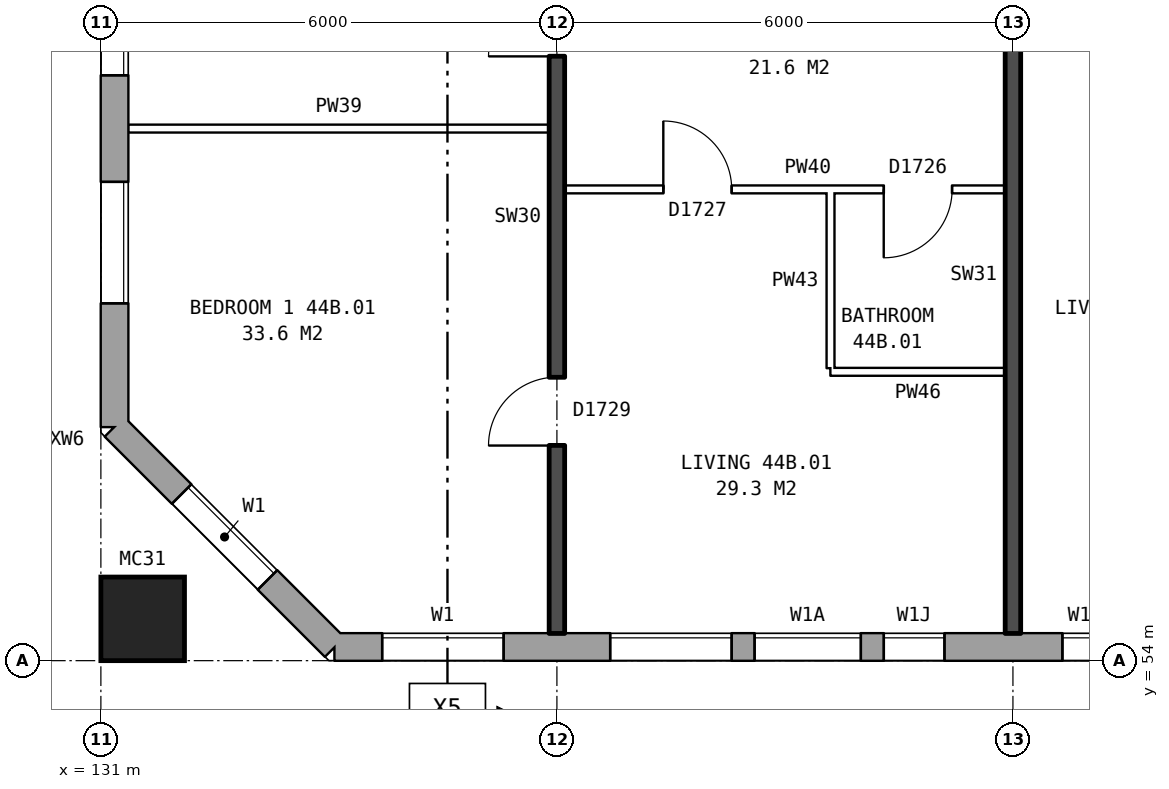
"""IFC4 building model, lengths in metres.
Left out: names, types, materials, properties, quantities, classifications, styles, units other than length and angle.
Written with IfcOpenShell. Run it as: python <this file> out.ifc"""

import sys

from ifc_helpers import new_model, si_unit, direction, frame, frame_2d, origin, origin_2d, place, context, subcontext, project, spatial, rectangle, hollow_rectangle, extrude, element, fill, save


model = new_model("IFC4")
c1 = context("Model", 3, precision=1e-05, world=origin(), true_north=direction((0.0, 1.0)))
c2 = subcontext(c1, "Body", "Model", "MODEL_VIEW")
j1 = project(units=[si_unit("LENGTHUNIT", "METRE"), si_unit("PLANEANGLEUNIT", "RADIAN")], contexts=[c1])
p1 = place(None, origin())
s1 = spatial("IfcSite", under=j1, at=p1, CompositionType="ELEMENT")
p2 = place(p1, origin())
s2 = spatial("IfcBuilding", under=s1, at=p2, CompositionType="ELEMENT")
p3 = place(p2, frame((0.0, 0.0, 157.8)))
s3 = spatial("IfcBuildingStorey", under=s2, at=p3, CompositionType="ELEMENT", Elevation=157.8)
p4 = place(p3, frame((131.55, 54.55, 0.0), z_axis=(0.0, 0.0, 1.0), x_axis=(1.0, 0.0, 0.0)))
e1 = element("IfcColumn", 1, at=p4, inside=s3, PredefinedType="COLUMN", context=c2, shape_type="SweptSolid", body=[
    extrude(hollow_rectangle(XDim=1.1, YDim=1.1, WallThickness=0.06, at=origin_2d()), origin(), (0.0, 0.0, 1.0), 3.1),
])
p5 = place(p3, frame((131.18, 57.075, 0.0), z_axis=(0.0, 0.0, 1.0), x_axis=(0.707106781187, -0.707106781187, 0.0)))
e2 = element("IfcWall", 2, at=p5, inside=s3, PredefinedType="STANDARD", context=c2, shape_type="SweptSolid", body=[
    extrude(rectangle(XDim=4.094, YDim=0.36, at=frame_2d((2.047, 0.0))), origin(), (0.0, 0.0, 1.0), 2.85),
])
p6 = place(p5, frame((1.247, 0.0, 0.8)))
e3 = element("IfcOpeningElement", 3, at=p6, cuts=e2, PredefinedType="OPENING", context=c2, shape_type="SweptSolid", body=[
    extrude(rectangle(XDim=1.6, YDim=1.8, at=frame_2d((0.8, 0.9))), frame((0.0, 0.19, 0.0), z_axis=(0.0, -1.0, 0.0), x_axis=(1.0, 0.0, 0.0)), (0.0, 0.0, 1.0), 0.38),
])
p7 = place(p3, frame((134.075, 54.18, 0.0), z_axis=(0.0, 0.0, 1.0), x_axis=(1.0, 0.0, 0.0)))
e4 = element("IfcWall", 4, at=p7, inside=s3, PredefinedType="STANDARD", context=c2, shape_type="SweptSolid", body=[
    extrude(rectangle(XDim=34.351, YDim=0.36, at=frame_2d((17.175, 0.0))), origin(), (0.0, 0.0, 1.0), 2.85),
])
p8 = place(p7, frame((0.625, 0.0, 0.8)))
e5 = element("IfcOpeningElement", 5, at=p8, cuts=e4, PredefinedType="OPENING", context=c2, shape_type="SweptSolid", body=[
    extrude(rectangle(XDim=1.6, YDim=1.8, at=frame_2d((0.8, 0.9))), frame((0.0, 0.19, 0.0), z_axis=(0.0, -1.0, 0.0), x_axis=(1.0, 0.0, 0.0)), (0.0, 0.0, 1.0), 0.38),
])
p9 = place(p7, frame((3.625, 0.0, 0.8)))
e6 = element("IfcOpeningElement", 6, at=p9, cuts=e4, PredefinedType="OPENING", context=c2, shape_type="SweptSolid", body=[
    extrude(rectangle(XDim=1.6, YDim=1.8, at=frame_2d((0.8, 0.9))), frame((0.0, 0.19, 0.0), z_axis=(0.0, -1.0, 0.0), x_axis=(1.0, 0.0, 0.0)), (0.0, 0.0, 1.0), 0.38),
])
p10 = place(p7, frame((5.525, 0.0, 0.8)))
e7 = element("IfcOpeningElement", 7, at=p10, cuts=e4, PredefinedType="OPENING", context=c2, shape_type="SweptSolid", body=[
    extrude(rectangle(XDim=1.4, YDim=1.8, at=frame_2d((0.7, 0.9))), frame((0.0, 0.19, 0.0), z_axis=(0.0, -1.0, 0.0), x_axis=(1.0, 0.0, 0.0)), (0.0, 0.0, 1.0), 0.38),
])
p11 = place(p7, frame((9.575, 0.0, 0.45)))
e8 = element("IfcOpeningElement", 8, at=p11, cuts=e4, PredefinedType="OPENING", context=c2, shape_type="SweptSolid", body=[
    extrude(rectangle(XDim=0.6, YDim=0.9, at=frame_2d((0.3, 0.45))), frame((0.0, 0.19, 0.0), z_axis=(0.0, -1.0, 0.0), x_axis=(1.0, 0.0, 0.0)), (0.0, 0.0, 1.0), 0.38),
])
p12 = place(p7, frame((12.625, 0.0, 0.8)))
e9 = element("IfcOpeningElement", 9, at=p12, cuts=e4, PredefinedType="OPENING", context=c2, shape_type="SweptSolid", body=[
    extrude(rectangle(XDim=1.6, YDim=1.8, at=frame_2d((0.8, 0.9))), frame((0.0, 0.19, 0.0), z_axis=(0.0, -1.0, 0.0), x_axis=(1.0, 0.0, 0.0)), (0.0, 0.0, 1.0), 0.38),
])
p13 = place(p7, frame((15.625, 0.0, 0.8)))
e10 = element("IfcOpeningElement", 10, at=p13, cuts=e4, PredefinedType="OPENING", context=c2, shape_type="SweptSolid", body=[
    extrude(rectangle(XDim=1.6, YDim=1.8, at=frame_2d((0.8, 0.9))), frame((0.0, 0.19, 0.0), z_axis=(0.0, -1.0, 0.0), x_axis=(1.0, 0.0, 0.0)), (0.0, 0.0, 1.0), 0.38),
])
p14 = place(p7, frame((18.625, 0.0, 0.8)))
e11 = element("IfcOpeningElement", 11, at=p14, cuts=e4, PredefinedType="OPENING", context=c2, shape_type="SweptSolid", body=[
    extrude(rectangle(XDim=1.6, YDim=1.8, at=frame_2d((0.8, 0.9))), frame((0.0, 0.19, 0.0), z_axis=(0.0, -1.0, 0.0), x_axis=(1.0, 0.0, 0.0)), (0.0, 0.0, 1.0), 0.38),
])
p15 = place(p7, frame((21.625, 0.0, 0.8)))
e12 = element("IfcOpeningElement", 12, at=p15, cuts=e4, PredefinedType="OPENING", context=c2, shape_type="SweptSolid", body=[
    extrude(rectangle(XDim=1.6, YDim=1.8, at=frame_2d((0.8, 0.9))), frame((0.0, 0.19, 0.0), z_axis=(0.0, -1.0, 0.0), x_axis=(1.0, 0.0, 0.0)), (0.0, 0.0, 1.0), 0.38),
])
p16 = place(p7, frame((23.525, 0.0, 0.8)))
e13 = element("IfcOpeningElement", 13, at=p16, cuts=e4, PredefinedType="OPENING", context=c2, shape_type="SweptSolid", body=[
    extrude(rectangle(XDim=0.8, YDim=0.9, at=frame_2d((0.4, 0.45))), frame((0.0, 0.19, 0.0), z_axis=(0.0, -1.0, 0.0), x_axis=(1.0, 0.0, 0.0)), (0.0, 0.0, 1.0), 0.38),
])
p17 = place(p7, frame((27.625, 0.0, 0.8)))
e14 = element("IfcOpeningElement", 14, at=p17, cuts=e4, PredefinedType="OPENING", context=c2, shape_type="SweptSolid", body=[
    extrude(rectangle(XDim=1.6, YDim=1.8, at=frame_2d((0.8, 0.9))), frame((0.0, 0.19, 0.0), z_axis=(0.0, -1.0, 0.0), x_axis=(1.0, 0.0, 0.0)), (0.0, 0.0, 1.0), 0.38),
])
p18 = place(p7, frame((30.625, 0.0, 0.8)))
e15 = element("IfcOpeningElement", 15, at=p18, cuts=e4, PredefinedType="OPENING", context=c2, shape_type="SweptSolid", body=[
    extrude(rectangle(XDim=1.6, YDim=1.8, at=frame_2d((0.8, 0.9))), frame((0.0, 0.19, 0.0), z_axis=(0.0, -1.0, 0.0), x_axis=(1.0, 0.0, 0.0)), (0.0, 0.0, 1.0), 0.38),
])
p19 = place(p7, frame((7.225, 0.0, 1.0)))
e16 = element("IfcOpeningElement", 16, at=p19, cuts=e4, PredefinedType="OPENING", context=c2, shape_type="SweptSolid", body=[
    extrude(rectangle(XDim=0.8, YDim=1.5, at=frame_2d((0.4, 0.75))), frame((0.0, 0.19, 0.0), z_axis=(0.0, -1.0, 0.0), x_axis=(1.0, 0.0, 0.0)), (0.0, 0.0, 1.0), 0.38),
])
p20 = place(p7, frame((10.575, 0.0, 0.45)))
e17 = element("IfcOpeningElement", 17, at=p20, cuts=e4, PredefinedType="OPENING", context=c2, shape_type="SweptSolid", body=[
    extrude(rectangle(XDim=1.2, YDim=1.8, at=frame_2d((0.6, 0.9))), frame((0.0, 0.19, 0.0), z_axis=(0.0, -1.0, 0.0), x_axis=(1.0, 0.0, 0.0)), (0.0, 0.0, 1.0), 0.38),
])
p21 = place(p7, frame((25.525, 0.0, 1.7)))
e18 = element("IfcOpeningElement", 18, at=p21, cuts=e4, PredefinedType="OPENING", context=c2, shape_type="SweptSolid", body=[
    extrude(rectangle(XDim=1.2, YDim=0.9, at=frame_2d((0.6, 0.45))), frame((0.0, 0.19, 0.0), z_axis=(0.0, -1.0, 0.0), x_axis=(1.0, 0.0, 0.0)), (0.0, 0.0, 1.0), 0.38),
])
p22 = place(p3, frame((131.18, 82.925, 0.0), z_axis=(0.0, 0.0, 1.0), x_axis=(0.0, -1.0, 0.0)))
e19 = element("IfcWall", 19, at=p22, inside=s3, PredefinedType="STANDARD", context=c2, shape_type="SweptSolid", body=[
    extrude(rectangle(XDim=25.851, YDim=0.36, at=frame_2d((12.925, 0.0))), origin(), (0.0, 0.0, 1.0), 2.85),
])
p23 = place(p22, frame((1.625, 0.0, 0.8)))
e20 = element("IfcOpeningElement", 20, at=p23, cuts=e19, PredefinedType="OPENING", context=c2, shape_type="SweptSolid", body=[
    extrude(rectangle(XDim=1.6, YDim=1.8, at=frame_2d((0.8, 0.9))), frame((0.0, 0.19, 0.0), z_axis=(0.0, -1.0, 0.0), x_axis=(1.0, 0.0, 0.0)), (0.0, 0.0, 1.0), 0.38),
])
p24 = place(p22, frame((4.625, 0.0, 0.8)))
e21 = element("IfcOpeningElement", 21, at=p24, cuts=e19, PredefinedType="OPENING", context=c2, shape_type="SweptSolid", body=[
    extrude(rectangle(XDim=1.6, YDim=1.8, at=frame_2d((0.8, 0.9))), frame((0.0, 0.19, 0.0), z_axis=(0.0, -1.0, 0.0), x_axis=(1.0, 0.0, 0.0)), (0.0, 0.0, 1.0), 0.38),
])
p25 = place(p22, frame((19.625, 0.0, 0.8)))
e22 = element("IfcOpeningElement", 22, at=p25, cuts=e19, PredefinedType="OPENING", context=c2, shape_type="SweptSolid", body=[
    extrude(rectangle(XDim=1.6, YDim=1.8, at=frame_2d((0.8, 0.9))), frame((0.0, 0.19, 0.0), z_axis=(0.0, -1.0, 0.0), x_axis=(1.0, 0.0, 0.0)), (0.0, 0.0, 1.0), 0.38),
])
p26 = place(p22, frame((22.625, 0.0, 0.8)))
e23 = element("IfcOpeningElement", 23, at=p26, cuts=e19, PredefinedType="OPENING", context=c2, shape_type="SweptSolid", body=[
    extrude(rectangle(XDim=1.6, YDim=1.8, at=frame_2d((0.8, 0.9))), frame((0.0, 0.19, 0.0), z_axis=(0.0, -1.0, 0.0), x_axis=(1.0, 0.0, 0.0)), (0.0, 0.0, 1.0), 0.38),
])
p27 = place(p3, frame((140.6, 57.8, 0.0), z_axis=(0.0, 0.0, 1.0), x_axis=(1.0, 0.0, 0.0)))
e24 = element("IfcWall", 24, at=p27, inside=s3, PredefinedType="PARTITIONING", context=c2, shape_type="SweptSolid", body=[
    extrude(rectangle(XDim=2.3, YDim=0.1, at=frame_2d((1.15, 0.0))), origin(), (0.0, 0.0, 1.0), 2.85),
])
p28 = place(p3, frame((137.1, 60.2, 0.0), z_axis=(0.0, 0.0, 1.0), x_axis=(1.0, 0.0, 0.0)))
e25 = element("IfcWall", 25, at=p28, inside=s3, PredefinedType="PARTITIONING", context=c2, shape_type="SweptSolid", body=[
    extrude(rectangle(XDim=5.8, YDim=0.1, at=frame_2d((2.9, 0.0))), origin(), (0.0, 0.0, 1.0), 2.85),
])
p29 = place(p28, frame((1.3, 0.0, 0.0)))
e26 = element("IfcOpeningElement", 26, at=p29, cuts=e25, PredefinedType="OPENING", context=c2, shape_type="SweptSolid", body=[
    extrude(rectangle(XDim=0.9, YDim=2.1, at=frame_2d((0.45, 1.05))), frame((0.0, 0.06, 0.0), z_axis=(0.0, -1.0, 0.0), x_axis=(1.0, 0.0, 0.0)), (0.0, 0.0, 1.0), 0.12),
])
p30 = place(p28, frame((4.2, 0.0, 0.0)))
e27 = element("IfcOpeningElement", 27, at=p30, cuts=e25, PredefinedType="OPENING", context=c2, shape_type="SweptSolid", body=[
    extrude(rectangle(XDim=0.9, YDim=2.1, at=frame_2d((0.45, 1.05))), frame((0.0, 0.06, 0.0), z_axis=(0.0, -1.0, 0.0), x_axis=(1.0, 0.0, 0.0)), (0.0, 0.0, 1.0), 0.12),
])
p31 = place(p3, frame((131.36, 61.0, 0.0), z_axis=(0.0, 0.0, 1.0), x_axis=(1.0, 0.0, 0.0)))
e28 = element("IfcWall", 28, at=p31, inside=s3, PredefinedType="PARTITIONING", context=c2, shape_type="SweptSolid", body=[
    extrude(rectangle(XDim=5.54, YDim=0.1, at=frame_2d((2.77, 0.0))), origin(), (0.0, 0.0, 1.0), 2.85),
])
p32 = place(p3, frame((137.0, 54.36, 0.0), z_axis=(0.0, 0.0, 1.0), x_axis=(0.0, 1.0, 0.0)))
e29 = element("IfcWall", 29, at=p32, inside=s3, PredefinedType="SOLIDWALL", context=c2, shape_type="SweptSolid", body=[
    extrude(rectangle(XDim=9.44, YDim=0.2, at=frame_2d((4.72, 0.0))), origin(), (0.0, 0.0, 1.0), 2.85),
])
p33 = place(p32, frame((2.47, 0.0, 0.0)))
e30 = element("IfcOpeningElement", 30, at=p33, cuts=e29, PredefinedType="OPENING", context=c2, shape_type="SweptSolid", body=[
    extrude(rectangle(XDim=0.9, YDim=2.1, at=frame_2d((0.45, 1.05))), frame((0.0, 0.11, 0.0), z_axis=(0.0, -1.0, 0.0), x_axis=(1.0, 0.0, 0.0)), (0.0, 0.0, 1.0), 0.22),
])
p34 = place(p32, frame((7.59, 0.0, 0.0)))
e31 = element("IfcOpeningElement", 31, at=p34, cuts=e29, PredefinedType="OPENING", context=c2, shape_type="SweptSolid", body=[
    extrude(rectangle(XDim=0.9, YDim=2.1, at=frame_2d((0.45, 1.05))), frame((0.0, 0.11, 0.0), z_axis=(0.0, -1.0, 0.0), x_axis=(1.0, 0.0, 0.0)), (0.0, 0.0, 1.0), 0.22),
])
p35 = place(p3, frame((140.6, 57.85, 0.0), z_axis=(0.0, 0.0, 1.0), x_axis=(0.0, 1.0, 0.0)))
e32 = element("IfcWall", 32, at=p35, inside=s3, PredefinedType="PARTITIONING", context=c2, shape_type="SweptSolid", body=[
    extrude(rectangle(XDim=2.3, YDim=0.1, at=frame_2d((1.15, 0.0))), origin(), (0.0, 0.0, 1.0), 2.85),
])
p36 = place(p3, frame((143.0, 54.36, 0.0), z_axis=(0.0, 0.0, 1.0), x_axis=(0.0, 1.0, 0.0)))
e33 = element("IfcWall", 33, at=p36, inside=s3, PredefinedType="SOLIDWALL", context=c2, shape_type="SweptSolid", body=[
    extrude(rectangle(XDim=9.44, YDim=0.2, at=frame_2d((4.72, 0.0))), origin(), (0.0, 0.0, 1.0), 2.85),
])
p37 = place(p6, origin())
e34 = element("IfcWindow", 34, at=p37, inside=s3, PartitioningType="SINGLE_PANEL", PredefinedType="WINDOW", context=c2, shape_type="SweptSolid", body=[
    extrude(rectangle(XDim=1.6, YDim=1.8, at=frame_2d((0.8, 0.9))), frame((0.0, 0.15, 0.0), z_axis=(0.0, -1.0, 0.0), x_axis=(1.0, 0.0, 0.0)), (0.0, 0.0, 1.0), 0.06),
])
fill(e3, e34)
p38 = place(p8, origin())
e35 = element("IfcWindow", 35, at=p38, inside=s3, PartitioningType="SINGLE_PANEL", PredefinedType="WINDOW", context=c2, shape_type="SweptSolid", body=[
    extrude(rectangle(XDim=1.6, YDim=1.8, at=frame_2d((0.8, 0.9))), frame((0.0, 0.15, 0.0), z_axis=(0.0, -1.0, 0.0), x_axis=(1.0, 0.0, 0.0)), (0.0, 0.0, 1.0), 0.06),
])
fill(e5, e35)
p39 = place(p9, origin())
e36 = element("IfcWindow", 36, at=p39, inside=s3, PartitioningType="SINGLE_PANEL", PredefinedType="WINDOW", context=c2, shape_type="SweptSolid", body=[
    extrude(rectangle(XDim=1.6, YDim=1.8, at=frame_2d((0.8, 0.9))), frame((0.0, 0.15, 0.0), z_axis=(0.0, -1.0, 0.0), x_axis=(1.0, 0.0, 0.0)), (0.0, 0.0, 1.0), 0.06),
])
fill(e6, e36)
p40 = place(p10, origin())
e37 = element("IfcWindow", 37, at=p40, inside=s3, PartitioningType="SINGLE_PANEL", PredefinedType="WINDOW", context=c2, shape_type="SweptSolid", body=[
    extrude(rectangle(XDim=1.4, YDim=1.8, at=frame_2d((0.7, 0.9))), frame((0.0, 0.15, 0.0), z_axis=(0.0, -1.0, 0.0), x_axis=(1.0, 0.0, 0.0)), (0.0, 0.0, 1.0), 0.06),
])
fill(e7, e37)
p41 = place(p11, origin())
e38 = element("IfcWindow", 38, at=p41, inside=s3, PartitioningType="SINGLE_PANEL", PredefinedType="WINDOW", context=c2, shape_type="SweptSolid", body=[
    extrude(rectangle(XDim=0.6, YDim=0.9, at=frame_2d((0.3, 0.45))), frame((0.0, 0.15, 0.0), z_axis=(0.0, -1.0, 0.0), x_axis=(1.0, 0.0, 0.0)), (0.0, 0.0, 1.0), 0.06),
])
fill(e8, e38)
p42 = place(p25, origin())
e39 = element("IfcWindow", 39, at=p42, inside=s3, PartitioningType="SINGLE_PANEL", PredefinedType="WINDOW", context=c2, shape_type="SweptSolid", body=[
    extrude(rectangle(XDim=1.6, YDim=1.8, at=frame_2d((0.8, 0.9))), frame((0.0, 0.15, 0.0), z_axis=(0.0, -1.0, 0.0), x_axis=(1.0, 0.0, 0.0)), (0.0, 0.0, 1.0), 0.06),
])
fill(e22, e39)
p43 = place(p26, origin())
e40 = element("IfcWindow", 40, at=p43, inside=s3, PartitioningType="SINGLE_PANEL", PredefinedType="WINDOW", context=c2, shape_type="SweptSolid", body=[
    extrude(rectangle(XDim=1.6, YDim=1.8, at=frame_2d((0.8, 0.9))), frame((0.0, 0.15, 0.0), z_axis=(0.0, -1.0, 0.0), x_axis=(1.0, 0.0, 0.0)), (0.0, 0.0, 1.0), 0.06),
])
fill(e23, e40)
p44 = place(p33, origin())
e41 = element("IfcDoor", 41, at=p44, inside=s3, OperationType="SINGLE_SWING_LEFT", PredefinedType="DOOR", context=c2, shape_type="SweptSolid", body=[
    extrude(rectangle(XDim=0.9, YDim=2.1, at=frame_2d((0.45, 1.05))), frame((0.0, 0.025, 0.0), z_axis=(0.0, -1.0, 0.0), x_axis=(1.0, 0.0, 0.0)), (0.0, 0.0, 1.0), 0.05),
])
fill(e30, e41)
p45 = place(p34, origin())
e42 = element("IfcDoor", 42, at=p45, inside=s3, OperationType="SINGLE_SWING_LEFT", PredefinedType="DOOR", context=c2, shape_type="SweptSolid", body=[
    extrude(rectangle(XDim=0.9, YDim=2.1, at=frame_2d((0.45, 1.05))), frame((0.0, 0.025, 0.0), z_axis=(0.0, -1.0, 0.0), x_axis=(1.0, 0.0, 0.0)), (0.0, 0.0, 1.0), 0.05),
])
fill(e31, e42)
p46 = place(p29, origin())
e43 = element("IfcDoor", 43, at=p46, inside=s3, OperationType="SINGLE_SWING_LEFT", PredefinedType="DOOR", context=c2, shape_type="SweptSolid", body=[
    extrude(rectangle(XDim=0.9, YDim=2.1, at=frame_2d((0.45, 1.05))), frame((0.0, 0.025, 0.0), z_axis=(0.0, -1.0, 0.0), x_axis=(1.0, 0.0, 0.0)), (0.0, 0.0, 1.0), 0.05),
])
fill(e26, e43)
p47 = place(p30, frame((0.9, 0.0, 0.0), z_axis=(0.0, 0.0, 1.0), x_axis=(-1.0, 0.0, 0.0)))
e44 = element("IfcDoor", 44, at=p47, inside=s3, OperationType="SINGLE_SWING_RIGHT", PredefinedType="DOOR", context=c2, shape_type="SweptSolid", body=[
    extrude(rectangle(XDim=0.9, YDim=2.1, at=frame_2d((0.45, 1.05))), frame((0.0, 0.025, 0.0), z_axis=(0.0, -1.0, 0.0), x_axis=(1.0, 0.0, 0.0)), (0.0, 0.0, 1.0), 0.05),
])
fill(e27, e44)
p48 = place(p19, origin())
e45 = element("IfcWindow", 45, at=p48, inside=s3, PartitioningType="SINGLE_PANEL", PredefinedType="WINDOW", context=c2, shape_type="SweptSolid", body=[
    extrude(rectangle(XDim=0.8, YDim=1.5, at=frame_2d((0.4, 0.75))), frame((0.0, 0.15, 0.0), z_axis=(0.0, -1.0, 0.0), x_axis=(1.0, 0.0, 0.0)), (0.0, 0.0, 1.0), 0.06),
])
fill(e16, e45)
save(model, sys.argv[1])
